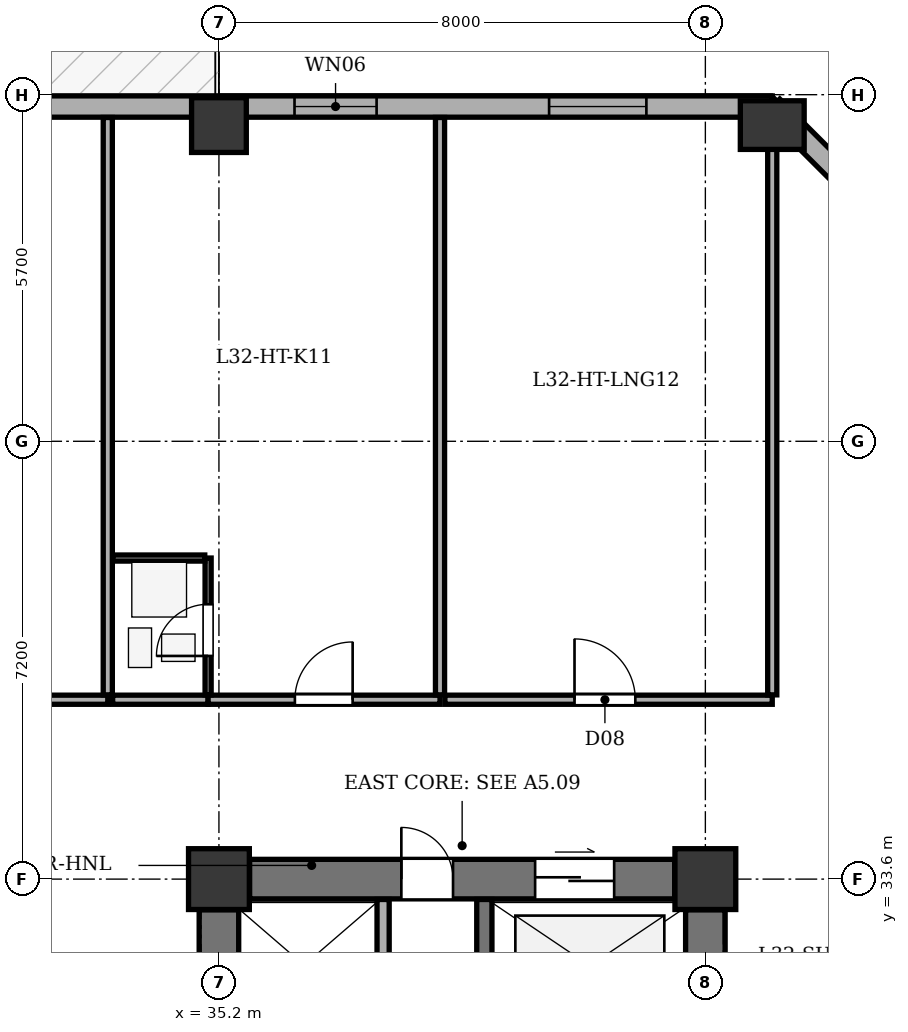
"""IFC4 building model, lengths in metres.
Left out: names, types, materials, properties, quantities, classifications, styles, units other than length and angle.
Written with IfcOpenShell. Run it as: python <this file> out.ifc"""

import sys

from ifc_helpers import new_model, si_unit, direction, frame, frame_2d, origin, origin_2d, place, context, subcontext, project, spatial, rectangle, extrude, element, fill, save


model = new_model("IFC4")
c1 = context("Model", 3, precision=1e-05, world=origin(), true_north=direction((0.0, 1.0)))
c2 = subcontext(c1, "Body", "Model", "MODEL_VIEW")
j1 = project(units=[si_unit("LENGTHUNIT", "METRE"), si_unit("PLANEANGLEUNIT", "RADIAN")], contexts=[c1])
p1 = place(None, origin())
s1 = spatial("IfcSite", under=j1, at=p1, CompositionType="ELEMENT")
p2 = place(p1, origin())
s2 = spatial("IfcBuilding", under=s1, at=p2, CompositionType="ELEMENT")
p3 = place(p2, frame((0.0, 0.0, 130.8)))
s3 = spatial("IfcBuildingStorey", under=s2, at=p3, CompositionType="ELEMENT", Elevation=130.8)
for number, where, z_axis, x_axis in (
    (1, (35.2, 33.6, 0.0), (0.0, 0.0, 1.0), (1.0, 0.0, 0.0)),
    (2, (43.2, 33.6, 0.0), (0.0, 0.0, 1.0), (1.0, 0.0, 0.0)),
):
    element("IfcColumn", number, at=place(p3, frame(where, z_axis=z_axis, x_axis=x_axis)), inside=s3, PredefinedType="COLUMN", context=c2, shape_type="SweptSolid", body=[
        extrude(rectangle(XDim=1.0, YDim=1.0, at=origin_2d()), origin(), (0.0, 0.0, 1.0), 3.5),
    ])
p4 = place(p3, frame((35.2, 46.0, 0.0), z_axis=(0.0, 0.0, 1.0), x_axis=(1.0, 0.0, 0.0)))
e3 = element("IfcColumn", 3, at=p4, inside=s3, PredefinedType="COLUMN", context=c2, shape_type="SweptSolid", body=[
    extrude(rectangle(XDim=0.9, YDim=0.9, at=origin_2d()), origin(), (0.0, 0.0, 1.0), 3.5),
])
p5 = place(p3, frame((44.3, 46.0, 0.0), z_axis=(0.0, 0.0, 1.0), x_axis=(1.0, 0.0, 0.0)))
e4 = element("IfcColumn", 4, at=p5, inside=s3, PredefinedType="COLUMN", context=c2, shape_type="SweptSolid", body=[
    extrude(rectangle(XDim=0.8, YDim=1.05, at=origin_2d()), origin(), (0.0, 0.0, 1.0), 3.5),
])
p6 = place(p3, frame((9.3, 46.305, 0.0), z_axis=(0.0, 0.0, 1.0), x_axis=(1.0, 0.0, 0.0)))
e5 = element("IfcWall", 5, at=p6, inside=s3, PredefinedType="STANDARD", context=c2, shape_type="SweptSolid", body=[
    extrude(rectangle(XDim=35.0, YDim=0.35, at=frame_2d((17.5, 0.0))), origin(), (0.0, 0.0, 1.0), 2.785),
])
p7 = place(p6, frame((14.4, 0.0, 0.0)))
e6 = element("IfcOpeningElement", 6, at=p7, cuts=e5, PredefinedType="OPENING", context=c2, shape_type="SweptSolid", body=[
    extrude(rectangle(XDim=1.0, YDim=2.02, at=frame_2d((0.5, 1.01))), frame((0.0, 0.185, 0.0), z_axis=(0.0, -1.0, 0.0), x_axis=(1.0, 0.0, 0.0)), (0.0, 0.0, 1.0), 0.37),
])
p8 = place(p6, frame((2.953, 0.0, 0.75)))
e7 = element("IfcOpeningElement", 7, at=p8, cuts=e5, PredefinedType="OPENING", context=c2, shape_type="SweptSolid", body=[
    extrude(rectangle(XDim=1.6, YDim=1.75, at=frame_2d((0.8, 0.875))), frame((0.0, 0.185, 0.0), z_axis=(0.0, -1.0, 0.0), x_axis=(1.0, 0.0, 0.0)), (0.0, 0.0, 1.0), 0.37),
])
p9 = place(p6, frame((8.178, 0.0, 0.75)))
e8 = element("IfcOpeningElement", 8, at=p9, cuts=e5, PredefinedType="OPENING", context=c2, shape_type="SweptSolid", body=[
    extrude(rectangle(XDim=1.6, YDim=1.75, at=frame_2d((0.8, 0.875))), frame((0.0, 0.185, 0.0), z_axis=(0.0, -1.0, 0.0), x_axis=(1.0, 0.0, 0.0)), (0.0, 0.0, 1.0), 0.37),
])
p10 = place(p6, frame((20.686, 0.0, 0.75)))
e9 = element("IfcOpeningElement", 9, at=p10, cuts=e5, PredefinedType="OPENING", context=c2, shape_type="SweptSolid", body=[
    extrude(rectangle(XDim=1.6, YDim=1.75, at=frame_2d((0.8, 0.875))), frame((0.0, 0.185, 0.0), z_axis=(0.0, -1.0, 0.0), x_axis=(1.0, 0.0, 0.0)), (0.0, 0.0, 1.0), 0.37),
])
p11 = place(p6, frame((27.143, 0.0, 0.75)))
e10 = element("IfcOpeningElement", 10, at=p11, cuts=e5, PredefinedType="OPENING", context=c2, shape_type="SweptSolid", body=[
    extrude(rectangle(XDim=1.35, YDim=1.75, at=frame_2d((0.675, 0.875))), frame((0.0, 0.185, 0.0), z_axis=(0.0, -1.0, 0.0), x_axis=(1.0, 0.0, 0.0)), (0.0, 0.0, 1.0), 0.37),
])
p12 = place(p6, frame((31.33, 0.0, 0.75)))
e11 = element("IfcOpeningElement", 11, at=p12, cuts=e5, PredefinedType="OPENING", context=c2, shape_type="SweptSolid", body=[
    extrude(rectangle(XDim=1.6, YDim=1.75, at=frame_2d((0.8, 0.875))), frame((0.0, 0.185, 0.0), z_axis=(0.0, -1.0, 0.0), x_axis=(1.0, 0.0, 0.0)), (0.0, 0.0, 1.0), 0.37),
])
p13 = place(p3, frame((44.3, 46.305, 0.0), z_axis=(0.0, 0.0, 1.0), x_axis=(0.707106781187, -0.707106781187, 0.0)))
e12 = element("IfcWall", 12, at=p13, inside=s3, PredefinedType="STANDARD", context=c2, shape_type="SweptSolid", body=[
    extrude(rectangle(XDim=6.795, YDim=0.35, at=frame_2d((3.397, 0.0))), origin(), (0.0, 0.0, 1.0), 2.785),
])
p14 = place(p13, frame((2.698, 0.0, 0.75)))
e13 = element("IfcOpeningElement", 13, at=p14, cuts=e12, PredefinedType="OPENING", context=c2, shape_type="SweptSolid", body=[
    extrude(rectangle(XDim=1.4, YDim=1.65, at=frame_2d((0.7, 0.825))), frame((0.0, 0.185, 0.0), z_axis=(0.0, -1.0, 0.0), x_axis=(1.0, 0.0, 0.0)), (0.0, 0.0, 1.0), 0.37),
])
p15 = place(p3, frame((43.2, 21.305, 0.0), z_axis=(0.0, 0.0, 1.0), x_axis=(0.0, 1.0, 0.0)))
e14 = element("IfcWall", 14, at=p15, inside=s3, PredefinedType="SHEAR", context=c2, shape_type="SweptSolid", body=[
    extrude(rectangle(XDim=11.79, YDim=0.65, at=frame_2d((5.895, 0.0))), origin(), (0.0, 0.0, 1.0), 3.2),
])
p16 = place(p3, frame((35.705, 33.6, 0.0), z_axis=(0.0, 0.0, 1.0), x_axis=(1.0, 0.0, 0.0)))
e15 = element("IfcWall", 15, at=p16, inside=s3, PredefinedType="SHEAR", context=c2, shape_type="SweptSolid", body=[
    extrude(rectangle(XDim=6.99, YDim=0.65, at=frame_2d((3.495, 0.0))), origin(), (0.0, 0.0, 1.0), 3.2),
])
p17 = place(p16, frame((4.695, 0.0, 0.0)))
e16 = element("IfcOpeningElement", 16, at=p17, cuts=e15, PredefinedType="OPENING", context=c2, shape_type="SweptSolid", body=[
    extrude(rectangle(XDim=1.3, YDim=2.15, at=frame_2d((0.65, 1.075))), frame((0.0, 0.335, 0.0), z_axis=(0.0, -1.0, 0.0), x_axis=(1.0, 0.0, 0.0)), (0.0, 0.0, 1.0), 0.67),
])
p18 = place(p16, frame((2.495, 0.0, 0.0)))
e17 = element("IfcOpeningElement", 17, at=p18, cuts=e15, PredefinedType="OPENING", context=c2, shape_type="SweptSolid", body=[
    extrude(rectangle(XDim=0.85, YDim=2.02, at=frame_2d((0.425, 1.01))), frame((0.0, 0.335, 0.0), z_axis=(0.0, -1.0, 0.0), x_axis=(1.0, 0.0, 0.0)), (0.0, 0.0, 1.0), 0.67),
])
p19 = place(p3, frame((35.2, 21.305, 0.0), z_axis=(0.0, 0.0, 1.0), x_axis=(0.0, 1.0, 0.0)))
e18 = element("IfcWall", 18, at=p19, inside=s3, PredefinedType="SHEAR", context=c2, shape_type="SweptSolid", body=[
    extrude(rectangle(XDim=11.79, YDim=0.65, at=frame_2d((5.895, 0.0))), origin(), (0.0, 0.0, 1.0), 3.2),
])
p20 = place(p19, frame((1.295, 0.0, 0.0)))
e19 = element("IfcOpeningElement", 19, at=p20, cuts=e18, PredefinedType="OPENING", context=c2, shape_type="SweptSolid", body=[
    extrude(rectangle(XDim=1.2, YDim=2.15, at=frame_2d((0.6, 1.075))), frame((0.0, 0.335, 0.0), z_axis=(0.0, -1.0, 0.0), x_axis=(1.0, 0.0, 0.0)), (0.0, 0.0, 1.0), 0.67),
])
p21 = place(p19, frame((4.295, 0.0, 0.0)))
e20 = element("IfcOpeningElement", 20, at=p21, cuts=e18, PredefinedType="OPENING", context=c2, shape_type="SweptSolid", body=[
    extrude(rectangle(XDim=1.1, YDim=2.1, at=frame_2d((0.55, 1.05))), frame((0.0, 0.335, 0.0), z_axis=(0.0, -1.0, 0.0), x_axis=(1.0, 0.0, 0.0)), (0.0, 0.0, 1.0), 0.67),
])
p22 = place(p19, frame((6.245, 0.0, 0.0)))
e21 = element("IfcOpeningElement", 21, at=p22, cuts=e18, PredefinedType="OPENING", context=c2, shape_type="SweptSolid", body=[
    extrude(rectangle(XDim=1.1, YDim=2.1, at=frame_2d((0.55, 1.05))), frame((0.0, 0.335, 0.0), z_axis=(0.0, -1.0, 0.0), x_axis=(1.0, 0.0, 0.0)), (0.0, 0.0, 1.0), 0.67),
])
p23 = place(p19, frame((8.195, 0.0, 0.0)))
e22 = element("IfcOpeningElement", 22, at=p23, cuts=e18, PredefinedType="OPENING", context=c2, shape_type="SweptSolid", body=[
    extrude(rectangle(XDim=1.1, YDim=2.1, at=frame_2d((0.55, 1.05))), frame((0.0, 0.335, 0.0), z_axis=(0.0, -1.0, 0.0), x_axis=(1.0, 0.0, 0.0)), (0.0, 0.0, 1.0), 0.67),
])
p24 = place(p3, frame((39.565, 21.135, 0.0), z_axis=(0.0, 0.0, 1.0), x_axis=(0.0, 1.0, 0.0)))
e23 = element("IfcWall", 23, at=p24, inside=s3, PredefinedType="SHEAR", context=c2, shape_type="SweptSolid", body=[
    extrude(rectangle(XDim=12.13, YDim=0.25, at=frame_2d((6.065, 0.0))), origin(), (0.0, 0.0, 1.0), 3.2),
])
p25 = place(p24, frame((0.515, 0.0, 0.0)))
e24 = element("IfcOpeningElement", 24, at=p25, cuts=e23, PredefinedType="OPENING", context=c2, shape_type="SweptSolid", body=[
    extrude(rectangle(XDim=1.2, YDim=2.15, at=frame_2d((0.6, 1.075))), frame((0.0, 0.135, 0.0), z_axis=(0.0, -1.0, 0.0), x_axis=(1.0, 0.0, 0.0)), (0.0, 0.0, 1.0), 0.27),
])
p26 = place(p24, frame((2.665, 0.0, 0.0)))
e25 = element("IfcOpeningElement", 25, at=p26, cuts=e23, PredefinedType="OPENING", context=c2, shape_type="SweptSolid", body=[
    extrude(rectangle(XDim=1.15, YDim=2.15, at=frame_2d((0.575, 1.075))), frame((0.0, 0.135, 0.0), z_axis=(0.0, -1.0, 0.0), x_axis=(1.0, 0.0, 0.0)), (0.0, 0.0, 1.0), 0.27),
])
p27 = place(p3, frame((37.9, 25.27, 0.0), z_axis=(0.0, 0.0, 1.0), x_axis=(0.0, 1.0, 0.0)))
e26 = element("IfcWall", 26, at=p27, inside=s3, PredefinedType="SOLIDWALL", context=c2, shape_type="SweptSolid", body=[
    extrude(rectangle(XDim=7.995, YDim=0.2, at=frame_2d((3.998, 0.0))), origin(), (0.0, 0.0, 1.0), 3.2),
])
p28 = place(p3, frame((29.216, 36.55, 0.0), z_axis=(0.0, 0.0, 1.0), x_axis=(1.0, 0.0, 0.0)))
e27 = element("IfcWall", 27, at=p28, inside=s3, PredefinedType="PARTITIONING", context=c2, shape_type="SweptSolid", body=[
    extrude(rectangle(XDim=4.156, YDim=0.15, at=frame_2d((2.078, 0.0))), origin(), (0.0, 0.0, 1.0), 3.2),
])
p29 = place(p28, frame((1.598, 0.0, 0.0)))
e28 = element("IfcOpeningElement", 28, at=p29, cuts=e27, PredefinedType="OPENING", context=c2, shape_type="SweptSolid", body=[
    extrude(rectangle(XDim=0.95, YDim=2.1, at=frame_2d((0.475, 1.05))), frame((0.0, 0.085, 0.0), z_axis=(0.0, -1.0, 0.0), x_axis=(1.0, 0.0, 0.0)), (0.0, 0.0, 1.0), 0.17),
])
p30 = place(p3, frame((33.372, 36.63, 0.0), z_axis=(0.0, 0.0, 1.0), x_axis=(0.0, 1.0, 0.0)))
e29 = element("IfcWall", 29, at=p30, inside=s3, PredefinedType="PARTITIONING", context=c2, shape_type="SweptSolid", body=[
    extrude(rectangle(XDim=9.495, YDim=0.15, at=frame_2d((4.748, 0.0))), origin(), (0.0, 0.0, 1.0), 3.2),
])
p31 = place(p3, frame((33.452, 36.55, 0.0), z_axis=(0.0, 0.0, 1.0), x_axis=(1.0, 0.0, 0.0)))
e30 = element("IfcWall", 30, at=p31, inside=s3, PredefinedType="PARTITIONING", context=c2, shape_type="SweptSolid", body=[
    extrude(rectangle(XDim=1.57, YDim=0.15, at=frame_2d((0.785, 0.0))), origin(), (0.0, 0.0, 1.0), 3.2),
])
p32 = place(p3, frame((35.022, 36.55, 0.0), z_axis=(0.0, 0.0, 1.0), x_axis=(1.0, 0.0, 0.0)))
e31 = element("IfcWall", 31, at=p32, inside=s3, PredefinedType="PARTITIONING", context=c2, shape_type="SweptSolid", body=[
    extrude(rectangle(XDim=3.814, YDim=0.15, at=frame_2d((1.907, 0.0))), origin(), (0.0, 0.0, 1.0), 3.2),
])
p33 = place(p32, frame((1.427, 0.0, 0.0)))
e32 = element("IfcOpeningElement", 32, at=p33, cuts=e31, PredefinedType="OPENING", context=c2, shape_type="SweptSolid", body=[
    extrude(rectangle(XDim=0.95, YDim=2.1, at=frame_2d((0.475, 1.05))), frame((0.0, 0.085, 0.0), z_axis=(0.0, -1.0, 0.0), x_axis=(1.0, 0.0, 0.0)), (0.0, 0.0, 1.0), 0.17),
])
p34 = place(p3, frame((35.022, 36.63, 0.0), z_axis=(0.0, 0.0, 1.0), x_axis=(0.0, 1.0, 0.0)))
e33 = element("IfcWall", 33, at=p34, inside=s3, PredefinedType="PARTITIONING", context=c2, shape_type="SweptSolid", body=[
    extrude(rectangle(XDim=2.25, YDim=0.1, at=frame_2d((1.125, 0.0))), origin(), (0.0, 0.0, 1.0), 2.535),
])
p35 = place(p34, frame((0.64, 0.0, 0.0)))
e34 = element("IfcOpeningElement", 34, at=p35, cuts=e33, PredefinedType="OPENING", context=c2, shape_type="SweptSolid", body=[
    extrude(rectangle(XDim=0.85, YDim=2.05, at=frame_2d((0.425, 1.025))), frame((0.0, 0.06, 0.0), z_axis=(0.0, -1.0, 0.0), x_axis=(1.0, 0.0, 0.0)), (0.0, 0.0, 1.0), 0.12),
])
p36 = place(p3, frame((33.452, 38.88, 0.0), z_axis=(0.0, 0.0, 1.0), x_axis=(1.0, 0.0, 0.0)))
e35 = element("IfcWall", 35, at=p36, inside=s3, PredefinedType="PARTITIONING", context=c2, shape_type="SweptSolid", body=[
    extrude(rectangle(XDim=1.515, YDim=0.1, at=frame_2d((0.758, 0.0))), origin(), (0.0, 0.0, 1.0), 3.2),
])
p37 = place(p3, frame((38.836, 36.63, 0.0), z_axis=(0.0, 0.0, 1.0), x_axis=(0.0, 1.0, 0.0)))
e36 = element("IfcWall", 36, at=p37, inside=s3, PredefinedType="PARTITIONING", context=c2, shape_type="SweptSolid", body=[
    extrude(rectangle(XDim=9.495, YDim=0.15, at=frame_2d((4.748, 0.0))), origin(), (0.0, 0.0, 1.0), 3.2),
])
p38 = place(p3, frame((38.916, 36.55, 0.0), z_axis=(0.0, 0.0, 1.0), x_axis=(1.0, 0.0, 0.0)))
e37 = element("IfcWall", 37, at=p38, inside=s3, PredefinedType="PARTITIONING", context=c2, shape_type="SweptSolid", body=[
    extrude(rectangle(XDim=5.384, YDim=0.15, at=frame_2d((2.692, 0.0))), origin(), (0.0, 0.0, 1.0), 3.2),
])
p39 = place(p38, frame((2.132, 0.0, 0.0)))
e38 = element("IfcOpeningElement", 38, at=p39, cuts=e37, PredefinedType="OPENING", context=c2, shape_type="SweptSolid", body=[
    extrude(rectangle(XDim=1.0, YDim=2.1, at=frame_2d((0.5, 1.05))), frame((0.0, 0.085, 0.0), z_axis=(0.0, -1.0, 0.0), x_axis=(1.0, 0.0, 0.0)), (0.0, 0.0, 1.0), 0.17),
])
p40 = place(p3, frame((44.3, 36.63, 0.0), z_axis=(0.0, 0.0, 1.0), x_axis=(0.0, 1.0, 0.0)))
e39 = element("IfcWall", 39, at=p40, inside=s3, PredefinedType="PARTITIONING", context=c2, shape_type="SweptSolid", body=[
    extrude(rectangle(XDim=9.495, YDim=0.15, at=frame_2d((4.748, 0.0))), origin(), (0.0, 0.0, 1.0), 3.2),
])
p41 = place(p11, origin())
e40 = element("IfcWindow", 40, at=p41, inside=s3, PartitioningType="SINGLE_PANEL", PredefinedType="WINDOW", context=c2, shape_type="SweptSolid", body=[
    extrude(rectangle(XDim=1.35, YDim=1.75, at=frame_2d((0.675, 0.875))), frame((0.0, -0.01, 0.0), z_axis=(0.0, -1.0, 0.0), x_axis=(1.0, 0.0, 0.0)), (0.0, 0.0, 1.0), 0.06),
])
fill(e10, e40)
p42 = place(p12, origin())
e41 = element("IfcWindow", 41, at=p42, inside=s3, PartitioningType="SINGLE_PANEL", PredefinedType="WINDOW", context=c2, shape_type="SweptSolid", body=[
    extrude(rectangle(XDim=1.6, YDim=1.75, at=frame_2d((0.8, 0.875))), frame((0.0, -0.01, 0.0), z_axis=(0.0, -1.0, 0.0), x_axis=(1.0, 0.0, 0.0)), (0.0, 0.0, 1.0), 0.06),
])
fill(e11, e41)
p43 = place(p17, origin())
e42 = element("IfcDoor", 42, at=p43, inside=s3, OperationType="DOUBLE_DOOR_SLIDING", PredefinedType="DOOR", context=c2, shape_type="SweptSolid", body=[
    extrude(rectangle(XDim=1.3, YDim=2.15, at=frame_2d((0.65, 1.075))), frame((0.0, 0.025, 0.0), z_axis=(0.0, -1.0, 0.0), x_axis=(1.0, 0.0, 0.0)), (0.0, 0.0, 1.0), 0.05),
])
fill(e16, e42)
p44 = place(p18, origin())
e43 = element("IfcDoor", 43, at=p44, inside=s3, OperationType="SINGLE_SWING_LEFT", PredefinedType="DOOR", context=c2, shape_type="SweptSolid", body=[
    extrude(rectangle(XDim=0.85, YDim=2.02, at=frame_2d((0.425, 1.01))), frame((0.0, 0.025, 0.0), z_axis=(0.0, -1.0, 0.0), x_axis=(1.0, 0.0, 0.0)), (0.0, 0.0, 1.0), 0.05),
])
fill(e17, e43)
p45 = place(p35, origin())
e44 = element("IfcDoor", 44, at=p45, inside=s3, OperationType="SINGLE_SWING_LEFT", PredefinedType="DOOR", context=c2, shape_type="SweptSolid", body=[
    extrude(rectangle(XDim=0.85, YDim=2.05, at=frame_2d((0.425, 1.025))), frame((0.0, 0.025, 0.0), z_axis=(0.0, -1.0, 0.0), x_axis=(1.0, 0.0, 0.0)), (0.0, 0.0, 1.0), 0.05),
])
fill(e34, e44)
p46 = place(p33, origin())
e45 = element("IfcDoor", 45, at=p46, inside=s3, OperationType="SINGLE_SWING_RIGHT", PredefinedType="DOOR", context=c2, shape_type="SweptSolid", body=[
    extrude(rectangle(XDim=0.95, YDim=2.1, at=frame_2d((0.475, 1.05))), frame((0.0, 0.025, 0.0), z_axis=(0.0, -1.0, 0.0), x_axis=(1.0, 0.0, 0.0)), (0.0, 0.0, 1.0), 0.05),
])
fill(e32, e45)
p47 = place(p39, origin())
e46 = element("IfcDoor", 46, at=p47, inside=s3, OperationType="SINGLE_SWING_LEFT", PredefinedType="DOOR", context=c2, shape_type="SweptSolid", body=[
    extrude(rectangle(XDim=1.0, YDim=2.1, at=frame_2d((0.5, 1.05))), frame((0.0, 0.025, 0.0), z_axis=(0.0, -1.0, 0.0), x_axis=(1.0, 0.0, 0.0)), (0.0, 0.0, 1.0), 0.05),
])
fill(e38, e46)
save(model, sys.argv[1])
